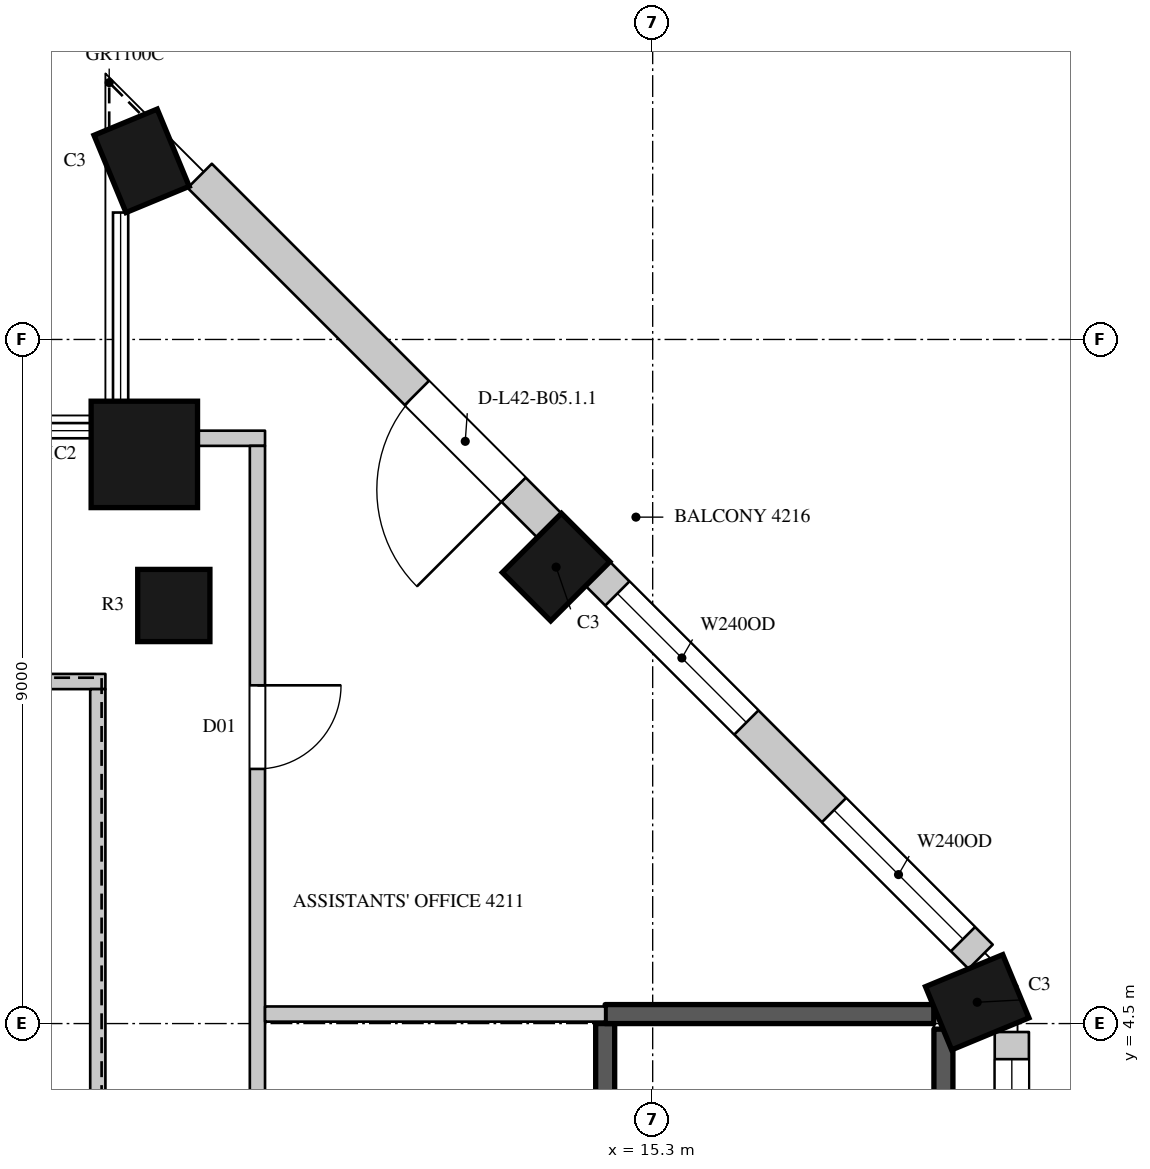
"""IFC4 building model, lengths in metres.
Left out: names, types, materials, properties, quantities, classifications, styles, units other than length and angle.
Written with IfcOpenShell. Run it as: python <this file> out.ifc"""

import sys

from ifc_helpers import new_model, si_unit, direction, frame, frame_2d, origin, origin_2d, place, context, subcontext, project, spatial, rectangle, circle, extrude, element, fill, save


model = new_model("IFC4")
c1 = context("Model", 3, precision=1e-05, world=origin(), true_north=direction((0.0, 1.0)))
c2 = subcontext(c1, "Body", "Model", "MODEL_VIEW")
j1 = project(units=[si_unit("LENGTHUNIT", "METRE"), si_unit("PLANEANGLEUNIT", "RADIAN")], contexts=[c1])
p1 = place(None, origin())
s1 = spatial("IfcSite", under=j1, at=p1, CompositionType="ELEMENT")
p2 = place(p1, origin())
s2 = spatial("IfcBuilding", under=s1, at=p2, CompositionType="ELEMENT")
p3 = place(p2, frame((0.0, 0.0, 193.3)))
s3 = spatial("IfcBuildingStorey", under=s2, at=p3, CompositionType="ELEMENT", Elevation=193.3)
for number, where, z_axis, x_axis in (
    (1, (19.57, 4.78, 0.0), (0.0, 0.0, 1.0), (-0.383, 0.924, 0.0)),
    (2, (14.029, 10.505, 0.0), (0.0, 0.0, 1.0), (-0.707, 0.707, 0.0)),
    (3, (8.576, 15.85, 0.0), (0.0, 0.0, 1.0), (-0.924, -0.383, 0.0)),
):
    element("IfcColumn", number, at=place(p3, frame(where, z_axis=z_axis, x_axis=x_axis)), inside=s3, PredefinedType="COLUMN", context=c2, shape_type="SweptSolid", body=[
        extrude(rectangle(XDim=0.9, YDim=1.1, at=origin_2d()), origin(), (0.0, 0.0, 1.0), 4.1),
    ])
p4 = place(p3, frame((8.612, 11.988, 0.0), z_axis=(0.0, 0.0, 1.0), x_axis=(1.0, 0.0, 0.0)))
e4 = element("IfcColumn", 4, at=p4, inside=s3, PredefinedType="COLUMN", context=c2, shape_type="SweptSolid", body=[
    extrude(circle(Radius=0.7, at=origin_2d()), origin(), (0.0, 0.0, 1.0), 4.1),
])
p5 = place(p3, frame((9.0, 10.0, 0.0), z_axis=(0.0, 0.0, 1.0), x_axis=(1.0, 0.0, 0.0)))
e5 = element("IfcColumn", 5, at=p5, inside=s3, PredefinedType="COLUMN", context=c2, shape_type="SweptSolid", body=[
    extrude(circle(Radius=0.475, at=origin_2d()), origin(), (0.0, 0.0, 1.0), 4.1),
])
p6 = place(p3, frame((20.025, -4.05, 0.0), z_axis=(0.0, 0.0, 1.0), x_axis=(0.0, 1.0, 0.0)))
e6 = element("IfcWall", 6, at=p6, inside=s3, PredefinedType="SOLIDWALL", context=c2, shape_type="SweptSolid", body=[
    extrude(rectangle(XDim=8.439, YDim=0.45, at=frame_2d((4.219, 0.0))), origin(), (0.0, 0.0, 1.0), 3.8),
])
p7 = place(p6, frame((0.394, 0.0, 1.05)))
e7 = element("IfcOpeningElement", 7, at=p7, cuts=e6, PredefinedType="OPENING", context=c2, shape_type="SweptSolid", body=[
    extrude(rectangle(XDim=3.0, YDim=2.4, at=frame_2d((1.5, 1.2))), frame((0.0, 0.235, 0.0), z_axis=(0.0, -1.0, 0.0), x_axis=(1.0, 0.0, 0.0)), (0.0, 0.0, 1.0), 0.47),
])
p8 = place(p6, frame((5.082, 0.0, 1.05)))
e8 = element("IfcOpeningElement", 8, at=p8, cuts=e6, PredefinedType="OPENING", context=c2, shape_type="SweptSolid", body=[
    extrude(rectangle(XDim=3.0, YDim=2.4, at=frame_2d((1.5, 1.2))), frame((0.0, 0.235, 0.0), z_axis=(0.0, -1.0, 0.0), x_axis=(1.0, 0.0, 0.0)), (0.0, 0.0, 1.0), 0.47),
])
p9 = place(p3, frame((19.615, 5.379, 0.0), z_axis=(0.0, 0.0, 1.0), x_axis=(-0.707089646058, 0.7071239159, 0.0)))
e9 = element("IfcWall", 9, at=p9, inside=s3, PredefinedType="SOLIDWALL", context=c2, shape_type="SweptSolid", body=[
    extrude(rectangle(XDim=7.124, YDim=0.45, at=frame_2d((3.562, 0.0))), origin(), (0.0, 0.0, 1.0), 3.8),
])
p10 = place(p9, frame((0.328, 0.0, 1.05)))
e10 = element("IfcOpeningElement", 10, at=p10, cuts=e9, PredefinedType="OPENING", context=c2, shape_type="SweptSolid", body=[
    extrude(rectangle(XDim=2.4, YDim=2.4, at=frame_2d((1.2, 1.2))), frame((0.0, 0.235, 0.0), z_axis=(0.0, -1.0, 0.0), x_axis=(1.0, 0.0, 0.0)), (0.0, 0.0, 1.0), 0.47),
])
p11 = place(p9, frame((4.359, 0.0, 1.05)))
e11 = element("IfcOpeningElement", 11, at=p11, cuts=e9, PredefinedType="OPENING", context=c2, shape_type="SweptSolid", body=[
    extrude(rectangle(XDim=2.4, YDim=2.4, at=frame_2d((1.2, 1.2))), frame((0.0, 0.235, 0.0), z_axis=(0.0, -1.0, 0.0), x_axis=(1.0, 0.0, 0.0)), (0.0, 0.0, 1.0), 0.47),
])
p12 = place(p3, frame((13.941, 11.053, 0.0), z_axis=(0.0, 0.0, 1.0), x_axis=(-0.707106781187, 0.707106781187, 0.0)))
e12 = element("IfcWall", 12, at=p12, inside=s3, PredefinedType="SOLIDWALL", context=c2, shape_type="SweptSolid", body=[
    extrude(rectangle(XDim=6.505, YDim=0.45, at=frame_2d((3.252, 0.0))), origin(), (0.0, 0.0, 1.0), 3.8),
])
p13 = place(p12, frame((0.665, 0.0, 0.0)))
e13 = element("IfcOpeningElement", 13, at=p13, cuts=e12, PredefinedType="OPENING", context=c2, shape_type="SweptSolid", body=[
    extrude(rectangle(XDim=1.8, YDim=2.4, at=frame_2d((0.9, 1.2))), frame((0.0, 0.235, 0.0), z_axis=(0.0, -1.0, 0.0), x_axis=(1.0, 0.0, 0.0)), (0.0, 0.0, 1.0), 0.47),
])
p14 = place(p3, frame((-6.1, 9.0, 0.0), z_axis=(0.0, 0.0, 1.0), x_axis=(1.0, 0.0, 0.0)))
e14 = element("IfcWall", 14, at=p14, inside=s3, PredefinedType="PARTITIONING", context=c2, shape_type="SweptSolid", body=[
    extrude(rectangle(XDim=14.2, YDim=0.2, at=frame_2d((7.1, 0.0))), origin(), (0.0, 0.0, 1.0), 3.8),
])
p15 = place(p3, frame((8.0, 0.02, 0.0), z_axis=(0.0, 0.0, 1.0), x_axis=(0.0, 1.0, 0.0)))
e15 = element("IfcWall", 15, at=p15, inside=s3, PredefinedType="PARTITIONING", context=c2, shape_type="SweptSolid", body=[
    extrude(rectangle(XDim=8.88, YDim=0.2, at=frame_2d((4.44, 0.0))), origin(), (0.0, 0.0, 1.0), 3.8),
])
p16 = place(p3, frame((9.296, 12.2, 0.0), z_axis=(0.0, 0.0, 1.0), x_axis=(1.0, 0.0, 0.0)))
e16 = element("IfcWall", 16, at=p16, inside=s3, PredefinedType="PARTITIONING", context=c2, shape_type="SweptSolid", body=[
    extrude(rectangle(XDim=0.904, YDim=0.2, at=frame_2d((0.452, 0.0))), origin(), (0.0, 0.0, 1.0), 3.8),
])
p17 = place(p3, frame((10.1, -11.1, 0.0), z_axis=(0.0, 0.0, 1.0), x_axis=(0.0, 1.0, 0.0)))
e17 = element("IfcWall", 17, at=p17, inside=s3, PredefinedType="PARTITIONING", context=c2, shape_type="SweptSolid", body=[
    extrude(rectangle(XDim=23.2, YDim=0.2, at=frame_2d((11.6, 0.0))), origin(), (0.0, 0.0, 1.0), 3.8),
])
p18 = place(p17, frame((8.0, 0.0, 0.0)))
e18 = element("IfcOpeningElement", 18, at=p18, cuts=e17, PredefinedType="OPENING", context=c2, shape_type="SweptSolid", body=[
    extrude(rectangle(XDim=1.5, YDim=2.4, at=frame_2d((0.75, 1.2))), frame((0.0, 0.11, 0.0), z_axis=(0.0, -1.0, 0.0), x_axis=(1.0, 0.0, 0.0)), (0.0, 0.0, 1.0), 0.22),
])
p19 = place(p17, frame((18.95, 0.0, 0.0)))
e19 = element("IfcOpeningElement", 19, at=p19, cuts=e17, PredefinedType="OPENING", context=c2, shape_type="SweptSolid", body=[
    extrude(rectangle(XDim=1.1, YDim=2.4, at=frame_2d((0.55, 1.2))), frame((0.0, 0.11, 0.0), z_axis=(0.0, -1.0, 0.0), x_axis=(1.0, 0.0, 0.0)), (0.0, 0.0, 1.0), 0.22),
])
p20 = place(p17, frame((2.7, 0.0, 0.0)))
e20 = element("IfcOpeningElement", 20, at=p20, cuts=e17, PredefinedType="OPENING", context=c2, shape_type="SweptSolid", body=[
    extrude(rectangle(XDim=1.1, YDim=2.4, at=frame_2d((0.55, 1.2))), frame((0.0, 0.11, 0.0), z_axis=(0.0, -1.0, 0.0), x_axis=(1.0, 0.0, 0.0)), (0.0, 0.0, 1.0), 0.22),
])
p21 = place(p3, frame((10.2, 4.625, 0.0), z_axis=(0.0, 0.0, 1.0), x_axis=(1.0, 0.0, 0.0)))
e21 = element("IfcWall", 21, at=p21, inside=s3, PredefinedType="PARTITIONING", context=c2, shape_type="SweptSolid", body=[
    extrude(rectangle(XDim=4.475, YDim=0.2, at=frame_2d((2.238, 0.0))), origin(), (0.0, 0.0, 1.0), 3.8),
])
p22 = place(p3, frame((14.675, -4.5, 0.0), z_axis=(0.0, 0.0, 1.0), x_axis=(0.0, 1.0, 0.0)))
e22 = element("IfcWall", 22, at=p22, inside=s3, PredefinedType="SHEAR", context=c2, shape_type="SweptSolid", body=[
    extrude(rectangle(XDim=9.0, YDim=0.25, at=frame_2d((4.5, 0.0))), origin(), (0.0, 0.0, 1.0), 3.8),
])
p23 = place(p22, frame((0.45, 0.0, 0.0)))
e23 = element("IfcOpeningElement", 23, at=p23, cuts=e22, PredefinedType="OPENING", context=c2, shape_type="SweptSolid", body=[
    extrude(rectangle(XDim=1.1, YDim=2.2, at=frame_2d((0.55, 1.1))), frame((0.0, 0.135, 0.0), z_axis=(0.0, -1.0, 0.0), x_axis=(1.0, 0.0, 0.0)), (0.0, 0.0, 1.0), 0.27),
])
p24 = place(p3, frame((14.675, 4.625, 0.0), z_axis=(0.0, 0.0, 1.0), x_axis=(1.0, 0.0, 0.0)))
e24 = element("IfcWall", 24, at=p24, inside=s3, PredefinedType="SHEAR", context=c2, shape_type="SweptSolid", body=[
    extrude(rectangle(XDim=4.324, YDim=0.25, at=frame_2d((2.162, 0.0))), origin(), (0.0, 0.0, 1.0), 3.8),
])
p25 = place(p3, frame((19.125, -4.05, 0.0), z_axis=(0.0, 0.0, 1.0), x_axis=(0.0, 1.0, 0.0)))
e25 = element("IfcWall", 25, at=p25, inside=s3, PredefinedType="SHEAR", context=c2, shape_type="SweptSolid", body=[
    extrude(rectangle(XDim=8.477, YDim=0.25, at=frame_2d((4.238, 0.0))), origin(), (0.0, 0.0, 1.0), 3.8),
])
p26 = place(p8, origin())
e26 = element("IfcWindow", 26, at=p26, inside=s3, PartitioningType="SINGLE_PANEL", PredefinedType="WINDOW", context=c2, shape_type="SweptSolid", body=[
    extrude(rectangle(XDim=3.0, YDim=2.4, at=frame_2d((1.5, 1.2))), frame((0.0, 0.135, 0.0), z_axis=(0.0, -1.0, 0.0), x_axis=(1.0, 0.0, 0.0)), (0.0, 0.0, 1.0), 0.06),
])
fill(e8, e26)
p27 = place(p10, origin())
e27 = element("IfcWindow", 27, at=p27, inside=s3, PartitioningType="SINGLE_PANEL", PredefinedType="WINDOW", context=c2, shape_type="SweptSolid", body=[
    extrude(rectangle(XDim=2.4, YDim=2.4, at=frame_2d((1.2, 1.2))), frame((0.0, 0.135, 0.0), z_axis=(0.0, -1.0, 0.0), x_axis=(1.0, 0.0, 0.0)), (0.0, 0.0, 1.0), 0.06),
])
fill(e10, e27)
p28 = place(p11, origin())
e28 = element("IfcWindow", 28, at=p28, inside=s3, PartitioningType="SINGLE_PANEL", PredefinedType="WINDOW", context=c2, shape_type="SweptSolid", body=[
    extrude(rectangle(XDim=2.4, YDim=2.4, at=frame_2d((1.2, 1.2))), frame((0.0, 0.135, 0.0), z_axis=(0.0, -1.0, 0.0), x_axis=(1.0, 0.0, 0.0)), (0.0, 0.0, 1.0), 0.06),
])
fill(e11, e28)
p29 = place(p13, origin())
e29 = element("IfcDoor", 29, at=p29, inside=s3, OperationType="SLIDING_TO_LEFT", PredefinedType="DOOR", context=c2, shape_type="SweptSolid", body=[
    extrude(rectangle(XDim=1.8, YDim=2.4, at=frame_2d((0.9, 1.2))), frame((0.0, 0.13, 0.0), z_axis=(0.0, -1.0, 0.0), x_axis=(1.0, 0.0, 0.0)), (0.0, 0.0, 1.0), 0.05),
])
fill(e13, e29)
p30 = place(p19, origin())
e30 = element("IfcDoor", 30, at=p30, inside=s3, OperationType="SINGLE_SWING_LEFT", PredefinedType="DOOR", context=c2, shape_type="SweptSolid", body=[
    extrude(rectangle(XDim=1.1, YDim=2.4, at=frame_2d((0.55, 1.2))), frame((0.0, 0.025, 0.0), z_axis=(0.0, -1.0, 0.0), x_axis=(1.0, 0.0, 0.0)), (0.0, 0.0, 1.0), 0.05),
])
fill(e19, e30)
save(model, sys.argv[1])
